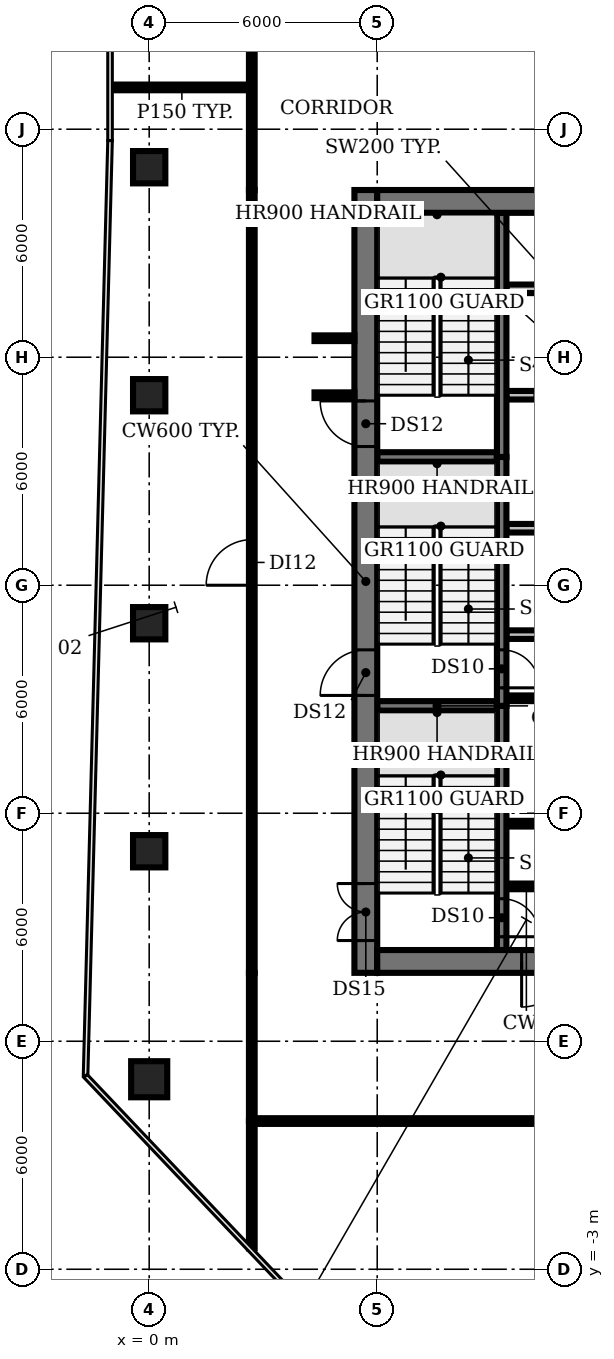
"""IFC4 building model, lengths in metres.
Left out: names, types, materials, properties, quantities, classifications, styles, units other than length and angle.
Written with IfcOpenShell. Run it as: python <this file> out.ifc"""

import sys

from ifc_helpers import new_model, si_unit, direction, frame, frame_2d, origin, origin_2d, place, context, subcontext, project, spatial, rectangle, circle, extrude, element, fill, save


model = new_model("IFC4")
c1 = context("Model", 3, precision=1e-05, world=origin(), true_north=direction((0.0, 1.0)))
c2 = subcontext(c1, "Body", "Model", "MODEL_VIEW")
j1 = project(units=[si_unit("LENGTHUNIT", "METRE"), si_unit("PLANEANGLEUNIT", "RADIAN")], contexts=[c1])
p1 = place(None, origin())
s1 = spatial("IfcSite", under=j1, at=p1, CompositionType="ELEMENT")
p2 = place(p1, origin())
s2 = spatial("IfcBuilding", under=s1, at=p2, CompositionType="ELEMENT")
p3 = place(p2, frame((0.0, 0.0, 163.4)))
s3 = spatial("IfcBuildingStorey", under=s2, at=p3, CompositionType="ELEMENT", Elevation=163.4)
p4 = place(p3, frame((0.0, 2.0, 0.0), z_axis=(0.0, 0.0, 1.0), x_axis=(1.0, 0.0, 0.0)))
e1 = element("IfcColumn", 1, at=p4, inside=s3, PredefinedType="COLUMN", context=c2, shape_type="SweptSolid", body=[
    extrude(circle(Radius=0.475, at=origin_2d()), origin(), (0.0, 0.0, 1.0), 3.85),
])
for number, where, z_axis, x_axis in (
    (2, (0.0, 8.0, 0.0), (0.0, 0.0, 1.0), (1.0, 0.0, 0.0)),
    (3, (0.0, 14.0, 0.0), (0.0, 0.0, 1.0), (1.0, 0.0, 0.0)),
    (4, (0.0, 20.0, 0.0), (0.0, 0.0, 1.0), (1.0, 0.0, 0.0)),
    (5, (0.0, 26.0, 0.0), (0.0, 0.0, 1.0), (1.0, 0.0, 0.0)),
):
    element("IfcColumn", number, at=place(p3, frame(where, z_axis=z_axis, x_axis=x_axis)), inside=s3, PredefinedType="COLUMN", context=c2, shape_type="SweptSolid", body=[
        extrude(rectangle(XDim=0.85, YDim=0.85, at=origin_2d()), origin(), (0.0, 0.0, 1.0), 3.85),
    ])
for number, where, z_axis, x_axis in (
    (6, (9.4, 7.075, 0.0), (0.0, 0.0, 1.0), (1.0, 0.0, 0.0)),
    (7, (9.4, 8.725, 0.0), (0.0, 0.0, 1.0), (1.0, 0.0, 0.0)),
    (8, (9.4, 10.375, 0.0), (0.0, 0.0, 1.0), (1.0, 0.0, 0.0)),
):
    element("IfcWall", number, at=place(p3, frame(where, z_axis=z_axis, x_axis=x_axis)), inside=s3, PredefinedType="SHEAR", context=c2, shape_type="SweptSolid", body=[
        extrude(rectangle(XDim=1.05, YDim=0.15, at=frame_2d((0.525, 0.0))), origin(), (0.0, 0.0, 1.0), 3.85),
    ])
p5 = place(p3, frame((6.0, 11.825, 0.0), z_axis=(0.0, 0.0, 1.0), x_axis=(1.0, 0.0, 0.0)))
e9 = element("IfcWall", 9, at=p5, inside=s3, PredefinedType="SHEAR", context=c2, shape_type="SweptSolid", body=[
    extrude(rectangle(XDim=3.15, YDim=0.25, at=frame_2d((1.575, 0.0))), origin(), (0.0, 0.0, 1.0), 3.85),
])
p6 = place(p3, frame((9.4, 12.025, 0.0), z_axis=(0.0, 0.0, 1.0), x_axis=(1.0, 0.0, 0.0)))
e10 = element("IfcWall", 10, at=p6, inside=s3, PredefinedType="SHEAR", context=c2, shape_type="SweptSolid", body=[
    extrude(rectangle(XDim=1.05, YDim=0.15, at=frame_2d((0.525, 0.0))), origin(), (0.0, 0.0, 1.0), 3.85),
])
p7 = place(p3, frame((9.4, 13.7, 0.0), z_axis=(0.0, 0.0, 1.0), x_axis=(1.0, 0.0, 0.0)))
e11 = element("IfcWall", 11, at=p7, inside=s3, PredefinedType="PARTITIONING", context=c2, shape_type="SweptSolid", body=[
    extrude(rectangle(XDim=4.0, YDim=0.225, at=frame_2d((2.0, 0.0))), origin(), (0.0, 0.0, 1.0), 3.85),
])
p8 = place(p3, frame((9.4, 16.5, 0.0), z_axis=(0.0, 0.0, 1.0), x_axis=(1.0, 0.0, 0.0)))
e12 = element("IfcWall", 12, at=p8, inside=s3, PredefinedType="PARTITIONING", context=c2, shape_type="SweptSolid", body=[
    extrude(rectangle(XDim=14.6, YDim=0.225, at=frame_2d((7.3, 0.0))), origin(), (0.0, 0.0, 1.0), 3.85),
])
p9 = place(p8, frame((1.6, 0.0, 0.0)))
e13 = element("IfcOpeningElement", 13, at=p9, cuts=e12, PredefinedType="OPENING", context=c2, shape_type="SweptSolid", body=[
    extrude(rectangle(XDim=1.0, YDim=2.1, at=frame_2d((0.5, 1.05))), frame((0.0, 0.123, 0.0), z_axis=(0.0, -1.0, 0.0), x_axis=(1.0, 0.0, 0.0)), (0.0, 0.0, 1.0), 0.245),
])
p10 = place(p8, frame((5.125, 0.0, 0.0)))
e14 = element("IfcOpeningElement", 14, at=p10, cuts=e12, PredefinedType="OPENING", context=c2, shape_type="SweptSolid", body=[
    extrude(rectangle(XDim=0.9, YDim=2.1, at=frame_2d((0.45, 1.05))), frame((0.0, 0.123, 0.0), z_axis=(0.0, -1.0, 0.0), x_axis=(1.0, 0.0, 0.0)), (0.0, 0.0, 1.0), 0.245),
])
p11 = place(p8, frame((7.675, 0.0, 0.0)))
e15 = element("IfcOpeningElement", 15, at=p11, cuts=e12, PredefinedType="OPENING", context=c2, shape_type="SweptSolid", body=[
    extrude(rectangle(XDim=0.9, YDim=2.1, at=frame_2d((0.45, 1.05))), frame((0.0, 0.123, 0.0), z_axis=(0.0, -1.0, 0.0), x_axis=(1.0, 0.0, 0.0)), (0.0, 0.0, 1.0), 0.245),
])
p12 = place(p8, frame((9.775, 0.0, 0.0)))
e16 = element("IfcOpeningElement", 16, at=p12, cuts=e12, PredefinedType="OPENING", context=c2, shape_type="SweptSolid", body=[
    extrude(rectangle(XDim=0.9, YDim=2.1, at=frame_2d((0.45, 1.05))), frame((0.0, 0.123, 0.0), z_axis=(0.0, -1.0, 0.0), x_axis=(1.0, 0.0, 0.0)), (0.0, 0.0, 1.0), 0.245),
])
p13 = place(p8, frame((11.647, 0.0, 0.0)))
e17 = element("IfcOpeningElement", 17, at=p13, cuts=e12, PredefinedType="OPENING", context=c2, shape_type="SweptSolid", body=[
    extrude(rectangle(XDim=0.9, YDim=2.1, at=frame_2d((0.45, 1.05))), frame((0.0, 0.123, 0.0), z_axis=(0.0, -1.0, 0.0), x_axis=(1.0, 0.0, 0.0)), (0.0, 0.0, 1.0), 0.245),
])
p14 = place(p8, frame((13.423, 0.0, 0.0)))
e18 = element("IfcOpeningElement", 18, at=p14, cuts=e12, PredefinedType="OPENING", context=c2, shape_type="SweptSolid", body=[
    extrude(rectangle(XDim=0.9, YDim=2.1, at=frame_2d((0.45, 1.05))), frame((0.0, 0.123, 0.0), z_axis=(0.0, -1.0, 0.0), x_axis=(1.0, 0.0, 0.0)), (0.0, 0.0, 1.0), 0.245),
])
p15 = place(p3, frame((6.0, 18.375, 0.0), z_axis=(0.0, 0.0, 1.0), x_axis=(1.0, 0.0, 0.0)))
e19 = element("IfcWall", 19, at=p15, inside=s3, PredefinedType="SHEAR", context=c2, shape_type="SweptSolid", body=[
    extrude(rectangle(XDim=3.15, YDim=0.25, at=frame_2d((1.575, 0.0))), origin(), (0.0, 0.0, 1.0), 3.85),
])
p16 = place(p3, frame((24.0, 20.0, 0.0), z_axis=(0.0, 0.0, 1.0), x_axis=(-1.0, 0.0, 0.0)))
e20 = element("IfcWall", 20, at=p16, inside=s3, PredefinedType="PARTITIONING", context=c2, shape_type="SweptSolid", body=[
    extrude(rectangle(XDim=14.6, YDim=0.225, at=frame_2d((7.3, 0.0))), origin(), (0.0, 0.0, 1.0), 3.85),
])
p17 = place(p16, frame((12.75, 0.0, 0.0)))
e21 = element("IfcOpeningElement", 21, at=p17, cuts=e20, PredefinedType="OPENING", context=c2, shape_type="SweptSolid", body=[
    extrude(rectangle(XDim=1.1, YDim=2.1, at=frame_2d((0.55, 1.05))), frame((0.0, 0.123, 0.0), z_axis=(0.0, -1.0, 0.0), x_axis=(1.0, 0.0, 0.0)), (0.0, 0.0, 1.0), 0.245),
])
p18 = place(p16, frame((9.95, 0.0, 0.0)))
e22 = element("IfcOpeningElement", 22, at=p18, cuts=e20, PredefinedType="OPENING", context=c2, shape_type="SweptSolid", body=[
    extrude(rectangle(XDim=1.1, YDim=2.1, at=frame_2d((0.55, 1.05))), frame((0.0, 0.123, 0.0), z_axis=(0.0, -1.0, 0.0), x_axis=(1.0, 0.0, 0.0)), (0.0, 0.0, 1.0), 0.245),
])
p19 = place(p16, frame((7.15, 0.0, 0.0)))
e23 = element("IfcOpeningElement", 23, at=p19, cuts=e20, PredefinedType="OPENING", context=c2, shape_type="SweptSolid", body=[
    extrude(rectangle(XDim=1.1, YDim=2.1, at=frame_2d((0.55, 1.05))), frame((0.0, 0.123, 0.0), z_axis=(0.0, -1.0, 0.0), x_axis=(1.0, 0.0, 0.0)), (0.0, 0.0, 1.0), 0.245),
])
p20 = place(p16, frame((4.35, 0.0, 0.0)))
e24 = element("IfcOpeningElement", 24, at=p20, cuts=e20, PredefinedType="OPENING", context=c2, shape_type="SweptSolid", body=[
    extrude(rectangle(XDim=1.1, YDim=2.1, at=frame_2d((0.55, 1.05))), frame((0.0, 0.123, 0.0), z_axis=(0.0, -1.0, 0.0), x_axis=(1.0, 0.0, 0.0)), (0.0, 0.0, 1.0), 0.245),
])
p21 = place(p16, frame((2.137, 0.0, 0.0)))
e25 = element("IfcOpeningElement", 25, at=p21, cuts=e20, PredefinedType="OPENING", context=c2, shape_type="SweptSolid", body=[
    extrude(rectangle(XDim=0.9, YDim=2.1, at=frame_2d((0.45, 1.05))), frame((0.0, 0.123, 0.0), z_axis=(0.0, -1.0, 0.0), x_axis=(1.0, 0.0, 0.0)), (0.0, 0.0, 1.0), 0.245),
])
p22 = place(p16, frame((0.363, 0.0, 0.0)))
e26 = element("IfcOpeningElement", 26, at=p22, cuts=e20, PredefinedType="OPENING", context=c2, shape_type="SweptSolid", body=[
    extrude(rectangle(XDim=0.9, YDim=2.1, at=frame_2d((0.45, 1.05))), frame((0.0, 0.123, 0.0), z_axis=(0.0, -1.0, 0.0), x_axis=(1.0, 0.0, 0.0)), (0.0, 0.0, 1.0), 0.245),
])
p23 = place(p3, frame((9.4, 22.8, 0.0), z_axis=(0.0, 0.0, 1.0), x_axis=(1.0, 0.0, 0.0)))
e27 = element("IfcWall", 27, at=p23, inside=s3, PredefinedType="PARTITIONING", context=c2, shape_type="SweptSolid", body=[
    extrude(rectangle(XDim=14.6, YDim=0.225, at=frame_2d((7.3, 0.0))), origin(), (0.0, 0.0, 1.0), 3.85),
])
p24 = place(p3, frame((9.275, 11.825, 0.0), z_axis=(0.0, 0.0, 1.0), x_axis=(0.0, -1.0, 0.0)))
e28 = element("IfcWall", 28, at=p24, inside=s3, PredefinedType="SHEAR", context=c2, shape_type="SweptSolid", body=[
    extrude(rectangle(XDim=6.425, YDim=0.25, at=frame_2d((3.212, 0.0))), origin(), (0.0, 0.0, 1.0), 3.85),
])
p25 = place(p24, frame((5.075, 0.0, 0.0)))
e29 = element("IfcOpeningElement", 29, at=p25, cuts=e28, PredefinedType="OPENING", context=c2, shape_type="SweptSolid", body=[
    extrude(rectangle(XDim=1.0, YDim=2.1, at=frame_2d((0.5, 1.05))), frame((0.0, 0.135, 0.0), z_axis=(0.0, -1.0, 0.0), x_axis=(1.0, 0.0, 0.0)), (0.0, 0.0, 1.0), 0.27),
])
p26 = place(p3, frame((9.275, 18.375, 0.0), z_axis=(0.0, 0.0, 1.0), x_axis=(0.0, -1.0, 0.0)))
e30 = element("IfcWall", 30, at=p26, inside=s3, PredefinedType="SHEAR", context=c2, shape_type="SweptSolid", body=[
    extrude(rectangle(XDim=6.55, YDim=0.25, at=frame_2d((3.275, 0.0))), origin(), (0.0, 0.0, 1.0), 3.85),
])
p27 = place(p26, frame((5.075, 0.0, 0.0)))
e31 = element("IfcOpeningElement", 31, at=p27, cuts=e30, PredefinedType="OPENING", context=c2, shape_type="SweptSolid", body=[
    extrude(rectangle(XDim=1.0, YDim=2.1, at=frame_2d((0.5, 1.05))), frame((0.0, 0.135, 0.0), z_axis=(0.0, -1.0, 0.0), x_axis=(1.0, 0.0, 0.0)), (0.0, 0.0, 1.0), 0.27),
])
p28 = place(p3, frame((9.275, 18.375, 0.0), z_axis=(0.0, 0.0, 1.0), x_axis=(0.0, 1.0, 0.0)))
e32 = element("IfcWall", 32, at=p28, inside=s3, PredefinedType="SHEAR", context=c2, shape_type="SweptSolid", body=[
    extrude(rectangle(XDim=6.425, YDim=0.25, at=frame_2d((3.212, 0.0))), origin(), (0.0, 0.0, 1.0), 3.85),
])
p29 = place(p3, frame((5.7, 4.8, 0.0), z_axis=(0.0, 0.0, 1.0), x_axis=(0.0, 1.0, 0.0)))
e33 = element("IfcWall", 33, at=p29, inside=s3, PredefinedType="SHEAR", context=c2, shape_type="SweptSolid", body=[
    extrude(rectangle(XDim=20.6, YDim=0.6, at=frame_2d((10.3, 0.0))), origin(), (0.0, 0.0, 1.0), 3.85),
])
p30 = place(p29, frame((0.85, 0.0, 0.0)))
e34 = element("IfcOpeningElement", 34, at=p30, cuts=e33, PredefinedType="OPENING", context=c2, shape_type="SweptSolid", body=[
    extrude(rectangle(XDim=1.5, YDim=2.1, at=frame_2d((0.75, 1.05))), frame((0.0, 0.31, 0.0), z_axis=(0.0, -1.0, 0.0), x_axis=(1.0, 0.0, 0.0)), (0.0, 0.0, 1.0), 0.62),
])
p31 = place(p29, frame((7.3, 0.0, 0.0)))
e35 = element("IfcOpeningElement", 35, at=p31, cuts=e33, PredefinedType="OPENING", context=c2, shape_type="SweptSolid", body=[
    extrude(rectangle(XDim=1.2, YDim=2.1, at=frame_2d((0.6, 1.05))), frame((0.0, 0.31, 0.0), z_axis=(0.0, -1.0, 0.0), x_axis=(1.0, 0.0, 0.0)), (0.0, 0.0, 1.0), 0.62),
])
p32 = place(p29, frame((13.85, 0.0, 0.0)))
e36 = element("IfcOpeningElement", 36, at=p32, cuts=e33, PredefinedType="OPENING", context=c2, shape_type="SweptSolid", body=[
    extrude(rectangle(XDim=1.2, YDim=2.1, at=frame_2d((0.6, 1.05))), frame((0.0, 0.31, 0.0), z_axis=(0.0, -1.0, 0.0), x_axis=(1.0, 0.0, 0.0)), (0.0, 0.0, 1.0), 0.62),
])
p33 = place(p3, frame((24.0, 5.1, 0.0), z_axis=(0.0, 0.0, 1.0), x_axis=(-1.0, 0.0, 0.0)))
e37 = element("IfcWall", 37, at=p33, inside=s3, PredefinedType="SHEAR", context=c2, shape_type="SweptSolid", body=[
    extrude(rectangle(XDim=18.0, YDim=0.6, at=frame_2d((9.0, 0.0))), origin(), (0.0, 0.0, 1.0), 3.85),
])
p34 = place(p33, frame((13.0, 0.0, 0.0)))
e38 = element("IfcOpeningElement", 38, at=p34, cuts=e37, PredefinedType="OPENING", context=c2, shape_type="SweptSolid", body=[
    extrude(rectangle(XDim=1.2, YDim=2.1, at=frame_2d((0.6, 1.05))), frame((0.0, 0.31, 0.0), z_axis=(0.0, -1.0, 0.0), x_axis=(1.0, 0.0, 0.0)), (0.0, 0.0, 1.0), 0.62),
])
p35 = place(p33, frame((4.9, 0.0, 0.0)))
e39 = element("IfcOpeningElement", 39, at=p35, cuts=e37, PredefinedType="OPENING", context=c2, shape_type="SweptSolid", body=[
    extrude(rectangle(XDim=1.0, YDim=2.1, at=frame_2d((0.5, 1.05))), frame((0.0, 0.31, 0.0), z_axis=(0.0, -1.0, 0.0), x_axis=(1.0, 0.0, 0.0)), (0.0, 0.0, 1.0), 0.62),
])
p36 = place(p3, frame((6.0, 25.1, 0.0), z_axis=(0.0, 0.0, 1.0), x_axis=(1.0, 0.0, 0.0)))
e40 = element("IfcWall", 40, at=p36, inside=s3, PredefinedType="SHEAR", context=c2, shape_type="SweptSolid", body=[
    extrude(rectangle(XDim=18.0, YDim=0.6, at=frame_2d((9.0, 0.0))), origin(), (0.0, 0.0, 1.0), 3.85),
])
p37 = place(p3, frame((-0.98, 28.1, 0.0), z_axis=(0.0, 0.0, 1.0), x_axis=(1.0, 0.0, 0.0)))
e41 = element("IfcWall", 41, at=p37, inside=s3, PredefinedType="PARTITIONING", context=c2, shape_type="SweptSolid", body=[
    extrude(rectangle(XDim=3.68, YDim=0.15, at=frame_2d((1.84, 0.0))), origin(), (0.0, 0.0, 1.0), 2.88),
])
p38 = place(p3, frame((2.7, -2.45, 0.0), z_axis=(0.0, 0.0, 1.0), x_axis=(0.0, 1.0, 0.0)))
e42 = element("IfcWall", 42, at=p38, inside=s3, PredefinedType="PARTITIONING", context=c2, shape_type="SweptSolid", body=[
    extrude(rectangle(XDim=3.35, YDim=0.15, at=frame_2d((1.675, 0.0))), origin(), (0.0, 0.0, 1.0), 2.88),
])
p39 = place(p3, frame((2.7, 0.9, 0.0), z_axis=(0.0, 0.0, 1.0), x_axis=(0.0, 1.0, 0.0)))
e43 = element("IfcWall", 43, at=p39, inside=s3, PredefinedType="PARTITIONING", context=c2, shape_type="SweptSolid", body=[
    extrude(rectangle(XDim=3.9, YDim=0.15, at=frame_2d((1.95, 0.0))), origin(), (0.0, 0.0, 1.0), 2.88),
])
p40 = place(p3, frame((2.7, 4.8, 0.0), z_axis=(0.0, 0.0, 1.0), x_axis=(0.0, 1.0, 0.0)))
e44 = element("IfcWall", 44, at=p40, inside=s3, PredefinedType="PARTITIONING", context=c2, shape_type="SweptSolid", body=[
    extrude(rectangle(XDim=20.6, YDim=0.15, at=frame_2d((10.3, 0.0))), origin(), (0.0, 0.0, 1.0), 2.88),
])
p41 = place(p40, frame((10.2, 0.0, 0.0)))
e45 = element("IfcOpeningElement", 45, at=p41, cuts=e44, PredefinedType="OPENING", context=c2, shape_type="SweptSolid", body=[
    extrude(rectangle(XDim=1.2, YDim=2.1, at=frame_2d((0.6, 1.05))), frame((0.0, 0.085, 0.0), z_axis=(0.0, -1.0, 0.0), x_axis=(1.0, 0.0, 0.0)), (0.0, 0.0, 1.0), 0.17),
])
p42 = place(p3, frame((2.7, 25.4, 0.0), z_axis=(0.0, 0.0, 1.0), x_axis=(0.0, 1.0, 0.0)))
e46 = element("IfcWall", 46, at=p42, inside=s3, PredefinedType="PARTITIONING", context=c2, shape_type="SweptSolid", body=[
    extrude(rectangle(XDim=3.9, YDim=0.15, at=frame_2d((1.95, 0.0))), origin(), (0.0, 0.0, 1.0), 2.88),
])
for number, where, z_axis, x_axis in (
    (47, (4.35, 20.0, 0.0), (0.0, 0.0, 1.0), (1.0, 0.0, 0.0)),
    (48, (4.35, 21.5, 0.0), (0.0, 0.0, 1.0), (1.0, 0.0, 0.0)),
):
    element("IfcWall", number, at=place(p3, frame(where, z_axis=z_axis, x_axis=x_axis)), inside=s3, PredefinedType="PARTITIONING", context=c2, shape_type="SweptSolid", body=[
        extrude(rectangle(XDim=1.05, YDim=0.15, at=frame_2d((0.525, 0.0))), origin(), (0.0, 0.0, 1.0), 2.88),
    ])
p43 = place(p3, frame((27.3, 0.9, 0.0), z_axis=(0.0, 0.0, 1.0), x_axis=(-1.0, 0.0, 0.0)))
e49 = element("IfcWall", 49, at=p43, inside=s3, PredefinedType="PARTITIONING", context=c2, shape_type="SweptSolid", body=[
    extrude(rectangle(XDim=24.6, YDim=0.15, at=frame_2d((12.3, 0.0))), origin(), (0.0, 0.0, 1.0), 2.88),
])
p44 = place(p43, frame((11.8, 0.0, 0.0)))
e50 = element("IfcOpeningElement", 50, at=p44, cuts=e49, PredefinedType="OPENING", context=c2, shape_type="SweptSolid", body=[
    extrude(rectangle(XDim=1.2, YDim=2.1, at=frame_2d((0.6, 1.05))), frame((0.0, 0.085, 0.0), z_axis=(0.0, -1.0, 0.0), x_axis=(1.0, 0.0, 0.0)), (0.0, 0.0, 1.0), 0.17),
])
p45 = place(p25, origin())
e51 = element("IfcDoor", 51, at=p45, inside=s3, OperationType="SINGLE_SWING_RIGHT", PredefinedType="DOOR", context=c2, shape_type="SweptSolid", body=[
    extrude(rectangle(XDim=1.0, YDim=2.1, at=frame_2d((0.5, 1.05))), frame((0.0, 0.025, 0.0), z_axis=(0.0, -1.0, 0.0), x_axis=(1.0, 0.0, 0.0)), (0.0, 0.0, 1.0), 0.05),
])
fill(e29, e51)
p46 = place(p27, origin())
e52 = element("IfcDoor", 52, at=p46, inside=s3, OperationType="SINGLE_SWING_RIGHT", PredefinedType="DOOR", context=c2, shape_type="SweptSolid", body=[
    extrude(rectangle(XDim=1.0, YDim=2.1, at=frame_2d((0.5, 1.05))), frame((0.0, 0.025, 0.0), z_axis=(0.0, -1.0, 0.0), x_axis=(1.0, 0.0, 0.0)), (0.0, 0.0, 1.0), 0.05),
])
fill(e31, e52)
p47 = place(p30, origin())
e53 = element("IfcDoor", 53, at=p47, inside=s3, OperationType="DOUBLE_DOOR_SINGLE_SWING", PredefinedType="DOOR", context=c2, shape_type="SweptSolid", body=[
    extrude(rectangle(XDim=1.5, YDim=2.1, at=frame_2d((0.75, 1.05))), frame((0.0, 0.025, 0.0), z_axis=(0.0, -1.0, 0.0), x_axis=(1.0, 0.0, 0.0)), (0.0, 0.0, 1.0), 0.05),
])
fill(e34, e53)
p48 = place(p31, origin())
e54 = element("IfcDoor", 54, at=p48, inside=s3, OperationType="SINGLE_SWING_LEFT", PredefinedType="DOOR", context=c2, shape_type="SweptSolid", body=[
    extrude(rectangle(XDim=1.2, YDim=2.1, at=frame_2d((0.6, 1.05))), frame((0.0, 0.025, 0.0), z_axis=(0.0, -1.0, 0.0), x_axis=(1.0, 0.0, 0.0)), (0.0, 0.0, 1.0), 0.05),
])
fill(e35, e54)
p49 = place(p32, origin())
e55 = element("IfcDoor", 55, at=p49, inside=s3, OperationType="SINGLE_SWING_RIGHT", PredefinedType="DOOR", context=c2, shape_type="SweptSolid", body=[
    extrude(rectangle(XDim=1.2, YDim=2.1, at=frame_2d((0.6, 1.05))), frame((0.0, 0.025, 0.0), z_axis=(0.0, -1.0, 0.0), x_axis=(1.0, 0.0, 0.0)), (0.0, 0.0, 1.0), 0.05),
])
fill(e36, e55)
p50 = place(p34, origin())
e56 = element("IfcDoor", 56, at=p50, inside=s3, OperationType="SINGLE_SWING_RIGHT", PredefinedType="DOOR", context=c2, shape_type="SweptSolid", body=[
    extrude(rectangle(XDim=1.2, YDim=2.1, at=frame_2d((0.6, 1.05))), frame((0.0, 0.025, 0.0), z_axis=(0.0, -1.0, 0.0), x_axis=(1.0, 0.0, 0.0)), (0.0, 0.0, 1.0), 0.05),
])
fill(e38, e56)
p51 = place(p41, origin())
e57 = element("IfcDoor", 57, at=p51, inside=s3, OperationType="SINGLE_SWING_LEFT", PredefinedType="DOOR", context=c2, shape_type="SweptSolid", body=[
    extrude(rectangle(XDim=1.2, YDim=2.1, at=frame_2d((0.6, 1.05))), frame((0.0, 0.025, 0.0), z_axis=(0.0, -1.0, 0.0), x_axis=(1.0, 0.0, 0.0)), (0.0, 0.0, 1.0), 0.05),
])
fill(e45, e57)
save(model, sys.argv[1])
